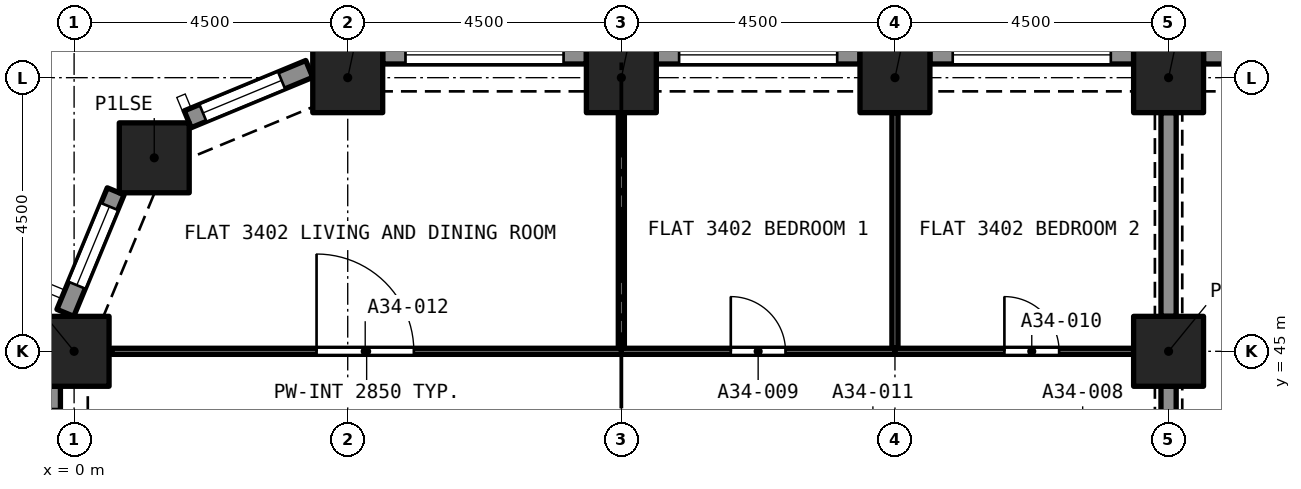
"""IFC4 building model, lengths in metres.
Left out: names, types, materials, properties, quantities, classifications, styles, units other than length and angle.
Written with IfcOpenShell. Run it as: python <this file> out.ifc"""

import sys

from ifc_helpers import new_model, si_unit, direction, frame, frame_2d, origin, origin_2d, place, context, subcontext, project, spatial, rectangle, extrude, element, fill, save


model = new_model("IFC4")
c1 = context("Model", 3, precision=1e-05, world=origin(), true_north=direction((0.0, 1.0)))
c2 = subcontext(c1, "Body", "Model", "MODEL_VIEW")
j1 = project(units=[si_unit("LENGTHUNIT", "METRE"), si_unit("PLANEANGLEUNIT", "RADIAN")], contexts=[c1])
p1 = place(None, origin())
s1 = spatial("IfcSite", under=j1, at=p1, CompositionType="ELEMENT")
p2 = place(p1, origin())
s2 = spatial("IfcBuilding", under=s1, at=p2, CompositionType="ELEMENT")
p3 = place(p2, frame((0.0, 0.0, 121.6)))
s3 = spatial("IfcBuildingStorey", under=s2, at=p3, CompositionType="ELEMENT", Elevation=121.6)
for number, where, z_axis, x_axis in (
    (1, (0.0, 45.0, 0.0), (0.0, 0.0, 1.0), (1.0, 0.0, 0.0)),
    (2, (18.0, 45.0, 0.0), (0.0, 0.0, 1.0), (1.0, 0.0, 0.0)),
    (3, (1.318, 48.182, 0.0), (0.0, 0.0, 1.0), (1.0, 0.0, 0.0)),
    (4, (4.5, 49.5, 0.0), (0.0, 0.0, 1.0), (1.0, 0.0, 0.0)),
    (5, (9.0, 49.5, 0.0), (0.0, 0.0, 1.0), (1.0, 0.0, 0.0)),
    (6, (13.5, 49.5, 0.0), (0.0, 0.0, 1.0), (1.0, 0.0, 0.0)),
    (7, (18.0, 49.5, 0.0), (0.0, 0.0, 1.0), (1.0, 0.0, 0.0)),
):
    element("IfcColumn", number, at=place(p3, frame(where, z_axis=z_axis, x_axis=x_axis)), inside=s3, PredefinedType="COLUMN", context=c2, shape_type="SweptSolid", body=[
        extrude(rectangle(XDim=1.15, YDim=1.15, at=origin_2d()), origin(), (0.0, 0.0, 1.0), 3.2),
    ])
p4 = place(p3, frame((18.575, 49.875, 0.0), z_axis=(0.0, 0.0, 1.0), x_axis=(1.0, 0.0, 0.0)))
e8 = element("IfcWall", 8, at=p4, inside=s3, PredefinedType="SOLIDWALL", context=c2, shape_type="SweptSolid", body=[
    extrude(rectangle(XDim=3.35, YDim=0.3, at=frame_2d((1.675, 0.0))), origin(), (0.0, 0.0, 1.0), 3.2),
])
p5 = place(p4, frame((0.375, 0.0, 0.45)))
e9 = element("IfcOpeningElement", 9, at=p5, cuts=e8, PredefinedType="OPENING", context=c2, shape_type="SweptSolid", body=[
    extrude(rectangle(XDim=2.6, YDim=1.95, at=frame_2d((1.3, 0.975))), frame((0.0, 0.16, 0.0), z_axis=(0.0, -1.0, 0.0), x_axis=(1.0, 0.0, 0.0)), (0.0, 0.0, 1.0), 0.32),
])
p6 = place(p3, frame((14.075, 49.875, 0.0), z_axis=(0.0, 0.0, 1.0), x_axis=(1.0, 0.0, 0.0)))
e10 = element("IfcWall", 10, at=p6, inside=s3, PredefinedType="SOLIDWALL", context=c2, shape_type="SweptSolid", body=[
    extrude(rectangle(XDim=3.35, YDim=0.3, at=frame_2d((1.675, 0.0))), origin(), (0.0, 0.0, 1.0), 3.2),
])
p7 = place(p6, frame((0.375, 0.0, 0.45)))
e11 = element("IfcOpeningElement", 11, at=p7, cuts=e10, PredefinedType="OPENING", context=c2, shape_type="SweptSolid", body=[
    extrude(rectangle(XDim=2.6, YDim=1.95, at=frame_2d((1.3, 0.975))), frame((0.0, 0.16, 0.0), z_axis=(0.0, -1.0, 0.0), x_axis=(1.0, 0.0, 0.0)), (0.0, 0.0, 1.0), 0.32),
])
p8 = place(p3, frame((9.575, 49.875, 0.0), z_axis=(0.0, 0.0, 1.0), x_axis=(1.0, 0.0, 0.0)))
e12 = element("IfcWall", 12, at=p8, inside=s3, PredefinedType="SOLIDWALL", context=c2, shape_type="SweptSolid", body=[
    extrude(rectangle(XDim=3.35, YDim=0.3, at=frame_2d((1.675, 0.0))), origin(), (0.0, 0.0, 1.0), 3.2),
])
p9 = place(p8, frame((0.375, 0.0, 0.45)))
e13 = element("IfcOpeningElement", 13, at=p9, cuts=e12, PredefinedType="OPENING", context=c2, shape_type="SweptSolid", body=[
    extrude(rectangle(XDim=2.6, YDim=1.95, at=frame_2d((1.3, 0.975))), frame((0.0, 0.16, 0.0), z_axis=(0.0, -1.0, 0.0), x_axis=(1.0, 0.0, 0.0)), (0.0, 0.0, 1.0), 0.32),
])
p10 = place(p3, frame((5.075, 49.875, 0.0), z_axis=(0.0, 0.0, 1.0), x_axis=(1.0, 0.0, 0.0)))
e14 = element("IfcWall", 14, at=p10, inside=s3, PredefinedType="SOLIDWALL", context=c2, shape_type="SweptSolid", body=[
    extrude(rectangle(XDim=3.35, YDim=0.3, at=frame_2d((1.675, 0.0))), origin(), (0.0, 0.0, 1.0), 3.2),
])
p11 = place(p10, frame((0.375, 0.0, 0.45)))
e15 = element("IfcOpeningElement", 15, at=p11, cuts=e14, PredefinedType="OPENING", context=c2, shape_type="SweptSolid", body=[
    extrude(rectangle(XDim=2.6, YDim=1.95, at=frame_2d((1.3, 0.975))), frame((0.0, 0.16, 0.0), z_axis=(0.0, -1.0, 0.0), x_axis=(1.0, 0.0, 0.0)), (0.0, 0.0, 1.0), 0.32),
])
p12 = place(p3, frame((1.869, 48.816, 0.0), z_axis=(0.0, 0.0, 1.0), x_axis=(0.923862802911, 0.382723818695, 0.0)))
e16 = element("IfcWall", 16, at=p12, inside=s3, PredefinedType="SOLIDWALL", context=c2, shape_type="SweptSolid", body=[
    extrude(rectangle(XDim=2.164, YDim=0.3, at=frame_2d((1.082, 0.0))), origin(), (0.0, 0.0, 1.0), 3.2),
])
p13 = place(p12, frame((0.271, 0.0, 0.45)))
e17 = element("IfcOpeningElement", 17, at=p13, cuts=e16, PredefinedType="OPENING", context=c2, shape_type="SweptSolid", body=[
    extrude(rectangle(XDim=1.4, YDim=1.95, at=frame_2d((0.7, 0.975))), frame((0.0, 0.16, 0.0), z_axis=(0.0, -1.0, 0.0), x_axis=(1.0, 0.0, 0.0)), (0.0, 0.0, 1.0), 0.32),
])
p14 = place(p3, frame((-0.144, 45.632, 0.0), z_axis=(0.0, 0.0, 1.0), x_axis=(0.382723818695, 0.923862802911, 0.0)))
e18 = element("IfcWall", 18, at=p14, inside=s3, PredefinedType="SOLIDWALL", context=c2, shape_type="SweptSolid", body=[
    extrude(rectangle(XDim=2.164, YDim=0.3, at=frame_2d((1.082, 0.0))), origin(), (0.0, 0.0, 1.0), 3.2),
])
p15 = place(p14, frame((0.493, 0.0, 0.45)))
e19 = element("IfcOpeningElement", 19, at=p15, cuts=e18, PredefinedType="OPENING", context=c2, shape_type="SweptSolid", body=[
    extrude(rectangle(XDim=1.4, YDim=1.95, at=frame_2d((0.7, 0.975))), frame((0.0, 0.16, 0.0), z_axis=(0.0, -1.0, 0.0), x_axis=(1.0, 0.0, 0.0)), (0.0, 0.0, 1.0), 0.32),
])
p16 = place(p3, frame((-0.375, 41.075, 0.0), z_axis=(0.0, 0.0, 1.0), x_axis=(0.0, 1.0, 0.0)))
e20 = element("IfcWall", 20, at=p16, inside=s3, PredefinedType="SOLIDWALL", context=c2, shape_type="SweptSolid", body=[
    extrude(rectangle(XDim=3.35, YDim=0.3, at=frame_2d((1.675, 0.0))), origin(), (0.0, 0.0, 1.0), 3.2),
])
p17 = place(p16, frame((0.375, 0.0, 0.45)))
e21 = element("IfcOpeningElement", 21, at=p17, cuts=e20, PredefinedType="OPENING", context=c2, shape_type="SweptSolid", body=[
    extrude(rectangle(XDim=2.6, YDim=1.95, at=frame_2d((1.3, 0.975))), frame((0.0, 0.16, 0.0), z_axis=(0.0, -1.0, 0.0), x_axis=(1.0, 0.0, 0.0)), (0.0, 0.0, 1.0), 0.32),
])
p18 = place(p3, frame((18.0, 41.075, 0.0), z_axis=(0.0, 0.0, 1.0), x_axis=(0.0, 1.0, 0.0)))
e22 = element("IfcWall", 22, at=p18, inside=s3, PredefinedType="PARTITIONING", context=c2, shape_type="SweptSolid", body=[
    extrude(rectangle(XDim=3.35, YDim=0.25, at=frame_2d((1.675, 0.0))), origin(), (0.0, 0.0, 1.0), 2.38),
])
p19 = place(p3, frame((13.5, 45.05, 0.0), z_axis=(0.0, 0.0, 1.0), x_axis=(0.0, 1.0, 0.0)))
e23 = element("IfcWall", 23, at=p19, inside=s3, PredefinedType="PARTITIONING", context=c2, shape_type="SweptSolid", body=[
    extrude(rectangle(XDim=3.875, YDim=0.1, at=frame_2d((1.938, 0.0))), origin(), (0.0, 0.0, 1.0), 2.85),
])
p20 = place(p3, frame((9.0, 45.0, 0.0), z_axis=(0.0, 0.0, 1.0), x_axis=(1.0, 0.0, 0.0)))
e24 = element("IfcWall", 24, at=p20, inside=s3, PredefinedType="PARTITIONING", context=c2, shape_type="SweptSolid", body=[
    extrude(rectangle(XDim=4.5, YDim=0.1, at=frame_2d((2.25, 0.0))), origin(), (0.0, 0.0, 1.0), 2.85),
])
p21 = place(p20, frame((1.8, 0.0, 0.0)))
e25 = element("IfcOpeningElement", 25, at=p21, cuts=e24, PredefinedType="OPENING", context=c2, shape_type="SweptSolid", body=[
    extrude(rectangle(XDim=0.9, YDim=2.1, at=frame_2d((0.45, 1.05))), frame((0.0, 0.06, 0.0), z_axis=(0.0, -1.0, 0.0), x_axis=(1.0, 0.0, 0.0)), (0.0, 0.0, 1.0), 0.12),
])
p22 = place(p3, frame((9.0, 45.05, 0.0), z_axis=(0.0, 0.0, 1.0), x_axis=(0.0, 1.0, 0.0)))
e26 = element("IfcWall", 26, at=p22, inside=s3, PredefinedType="PARTITIONING", context=c2, shape_type="SweptSolid", body=[
    extrude(rectangle(XDim=3.875, YDim=0.1, at=frame_2d((1.938, 0.0))), origin(), (0.0, 0.0, 1.0), 2.85),
])
p23 = place(p3, frame((13.5, 45.0, 0.0), z_axis=(0.0, 0.0, 1.0), x_axis=(1.0, 0.0, 0.0)))
e27 = element("IfcWall", 27, at=p23, inside=s3, PredefinedType="PARTITIONING", context=c2, shape_type="SweptSolid", body=[
    extrude(rectangle(XDim=3.925, YDim=0.1, at=frame_2d((1.962, 0.0))), origin(), (0.0, 0.0, 1.0), 2.85),
])
p24 = place(p23, frame((1.8, 0.0, 0.0)))
e28 = element("IfcOpeningElement", 28, at=p24, cuts=e27, PredefinedType="OPENING", context=c2, shape_type="SweptSolid", body=[
    extrude(rectangle(XDim=0.9, YDim=2.1, at=frame_2d((0.45, 1.05))), frame((0.0, 0.06, 0.0), z_axis=(0.0, -1.0, 0.0), x_axis=(1.0, 0.0, 0.0)), (0.0, 0.0, 1.0), 0.12),
])
p25 = place(p3, frame((18.0, 45.575, 0.0), z_axis=(0.0, 0.0, 1.0), x_axis=(0.0, 1.0, 0.0)))
e29 = element("IfcWall", 29, at=p25, inside=s3, PredefinedType="PARTITIONING", context=c2, shape_type="SweptSolid", body=[
    extrude(rectangle(XDim=3.35, YDim=0.25, at=frame_2d((1.675, 0.0))), origin(), (0.0, 0.0, 1.0), 2.38),
])
p26 = place(p3, frame((0.622, 45.0, 0.0), z_axis=(0.0, 0.0, 1.0), x_axis=(1.0, 0.0, 0.0)))
e30 = element("IfcWall", 30, at=p26, inside=s3, PredefinedType="PARTITIONING", context=c2, shape_type="SweptSolid", body=[
    extrude(rectangle(XDim=8.378, YDim=0.1, at=frame_2d((4.189, 0.0))), origin(), (0.0, 0.0, 1.0), 2.85),
])
p27 = place(p26, frame((3.365, 0.0, 0.0)))
e31 = element("IfcOpeningElement", 31, at=p27, cuts=e30, PredefinedType="OPENING", context=c2, shape_type="SweptSolid", body=[
    extrude(rectangle(XDim=1.6, YDim=2.1, at=frame_2d((0.8, 1.05))), frame((0.0, 0.06, 0.0), z_axis=(0.0, -1.0, 0.0), x_axis=(1.0, 0.0, 0.0)), (0.0, 0.0, 1.0), 0.12),
])
p28 = place(p7, origin())
e32 = element("IfcWindow", 32, at=p28, inside=s3, PartitioningType="SINGLE_PANEL", PredefinedType="WINDOW", context=c2, shape_type="SweptSolid", body=[
    extrude(rectangle(XDim=2.6, YDim=1.95, at=frame_2d((1.3, 0.975))), frame((0.0, 0.03, 0.0), z_axis=(0.0, -1.0, 0.0), x_axis=(1.0, 0.0, 0.0)), (0.0, 0.0, 1.0), 0.06),
])
fill(e11, e32)
p29 = place(p9, origin())
e33 = element("IfcWindow", 33, at=p29, inside=s3, PartitioningType="SINGLE_PANEL", PredefinedType="WINDOW", context=c2, shape_type="SweptSolid", body=[
    extrude(rectangle(XDim=2.6, YDim=1.95, at=frame_2d((1.3, 0.975))), frame((0.0, 0.03, 0.0), z_axis=(0.0, -1.0, 0.0), x_axis=(1.0, 0.0, 0.0)), (0.0, 0.0, 1.0), 0.06),
])
fill(e13, e33)
p30 = place(p11, origin())
e34 = element("IfcWindow", 34, at=p30, inside=s3, PartitioningType="SINGLE_PANEL", PredefinedType="WINDOW", context=c2, shape_type="SweptSolid", body=[
    extrude(rectangle(XDim=2.6, YDim=1.95, at=frame_2d((1.3, 0.975))), frame((0.0, 0.03, 0.0), z_axis=(0.0, -1.0, 0.0), x_axis=(1.0, 0.0, 0.0)), (0.0, 0.0, 1.0), 0.06),
])
fill(e15, e34)
p31 = place(p13, origin())
e35 = element("IfcWindow", 35, at=p31, inside=s3, PartitioningType="SINGLE_PANEL", PredefinedType="WINDOW", context=c2, shape_type="SweptSolid", body=[
    extrude(rectangle(XDim=1.4, YDim=1.95, at=frame_2d((0.7, 0.975))), frame((0.0, 0.03, 0.0), z_axis=(0.0, -1.0, 0.0), x_axis=(1.0, 0.0, 0.0)), (0.0, 0.0, 1.0), 0.06),
])
fill(e17, e35)
p32 = place(p15, origin())
e36 = element("IfcWindow", 36, at=p32, inside=s3, PartitioningType="SINGLE_PANEL", PredefinedType="WINDOW", context=c2, shape_type="SweptSolid", body=[
    extrude(rectangle(XDim=1.4, YDim=1.95, at=frame_2d((0.7, 0.975))), frame((0.0, 0.03, 0.0), z_axis=(0.0, -1.0, 0.0), x_axis=(1.0, 0.0, 0.0)), (0.0, 0.0, 1.0), 0.06),
])
fill(e19, e36)
p33 = place(p21, origin())
e37 = element("IfcDoor", 37, at=p33, inside=s3, OperationType="SINGLE_SWING_LEFT", PredefinedType="DOOR", context=c2, shape_type="SweptSolid", body=[
    extrude(rectangle(XDim=0.9, YDim=2.1, at=frame_2d((0.45, 1.05))), frame((0.0, 0.025, 0.0), z_axis=(0.0, -1.0, 0.0), x_axis=(1.0, 0.0, 0.0)), (0.0, 0.0, 1.0), 0.05),
])
fill(e25, e37)
p34 = place(p24, origin())
e38 = element("IfcDoor", 38, at=p34, inside=s3, OperationType="SINGLE_SWING_RIGHT", PredefinedType="DOOR", context=c2, shape_type="SweptSolid", body=[
    extrude(rectangle(XDim=0.9, YDim=2.1, at=frame_2d((0.45, 1.05))), frame((0.0, 0.025, 0.0), z_axis=(0.0, -1.0, 0.0), x_axis=(1.0, 0.0, 0.0)), (0.0, 0.0, 1.0), 0.05),
])
fill(e28, e38)
p35 = place(p27, origin())
e39 = element("IfcDoor", 39, at=p35, inside=s3, OperationType="SINGLE_SWING_LEFT", PredefinedType="DOOR", context=c2, shape_type="SweptSolid", body=[
    extrude(rectangle(XDim=1.6, YDim=2.1, at=frame_2d((0.8, 1.05))), frame((0.0, 0.025, 0.0), z_axis=(0.0, -1.0, 0.0), x_axis=(1.0, 0.0, 0.0)), (0.0, 0.0, 1.0), 0.05),
])
fill(e31, e39)
save(model, sys.argv[1])
